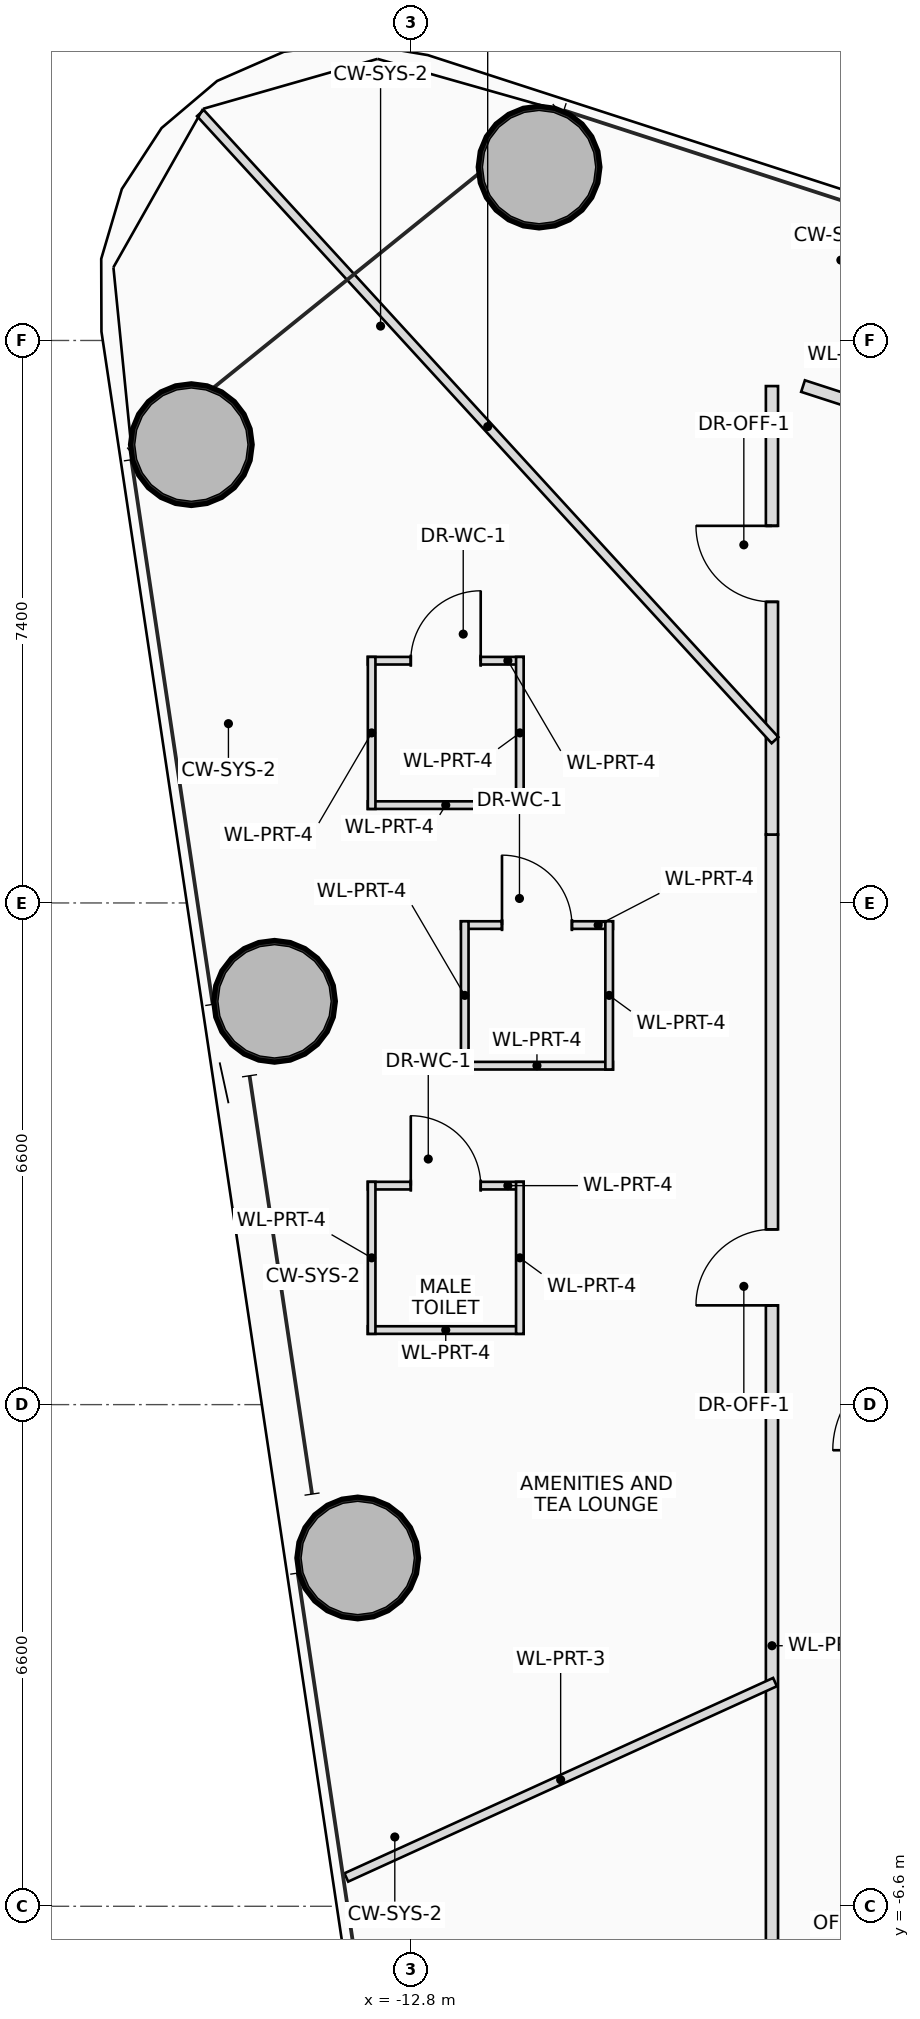
"""IFC4 building model, lengths in metres.
Left out: names, types, materials, properties, quantities, classifications, styles, units other than length and angle.
Written with IfcOpenShell. Run it as: python <this file> out.ifc"""

import sys

from ifc_helpers import new_model, si_unit, direction, frame, frame_2d, origin, origin_2d, place, context, subcontext, project, spatial, rectangle, hollow_circle, extrude, source, transform, mapped, element, fill, save


model = new_model("IFC4")
c1 = context("Model", 3, precision=1e-05, world=origin(), true_north=direction((0.0, 1.0)))
c2 = subcontext(c1, "Body", "Model", "MODEL_VIEW")
j1 = project(units=[si_unit("LENGTHUNIT", "METRE"), si_unit("PLANEANGLEUNIT", "RADIAN")], contexts=[c1])
p1 = place(None, origin())
s1 = spatial("IfcSite", under=j1, at=p1, CompositionType="ELEMENT")
p2 = place(p1, origin())
s2 = spatial("IfcBuilding", under=s1, at=p2, CompositionType="ELEMENT")
p3 = place(p2, frame((0.0, 0.0, 54.8)))
s3 = spatial("IfcBuildingStorey", under=s2, at=p3, CompositionType="ELEMENT", Elevation=54.8)
m1 = source(origin(), c2, "Body", "SweptSolid", [
    extrude(hollow_circle(Radius=0.8, WallThickness=0.055, at=origin_2d()), origin(), (0.0, 0.0, 1.0), 3.75),
])
for number, where, z_axis, x_axis in (
    (1, (-11.114, 16.281, 0.0), (0.0, 0.0, 1.0), (1.0, 0.0, 0.0)),
    (2, (-15.689, 12.629, 0.0), (0.0, 0.0, 1.0), (1.0, 0.0, 0.0)),
    (3, (-14.594, 5.306, 0.0), (0.0, 0.0, 1.0), (1.0, 0.0, 0.0)),
    (4, (-13.5, -2.018, 0.0), (0.0, 0.0, 1.0), (1.0, 0.0, 0.0)),
):
    element("IfcColumn", number, at=place(p3, frame(where, z_axis=z_axis, x_axis=x_axis)), inside=s3, PredefinedType="COLUMN", context=c2, shape_type="MappedRepresentation", body=[
        mapped(m1, transform((0.0, 0.0, 0.0), scale=1.0)),
    ])
p4 = place(p3, frame((-13.367, 2.881, 0.0), z_axis=(0.0, 0.0, 1.0), x_axis=(1.0, 0.0, 0.0)))
e5 = element("IfcWall", 5, at=p4, inside=s3, PredefinedType="PARTITIONING", context=c2, shape_type="SweptSolid", body=[
    extrude(rectangle(XDim=2.05, YDim=0.1, at=frame_2d((1.025, 0.0))), origin(), (0.0, 0.0, 1.0), 3.2),
])
p5 = place(p4, frame((0.565, 0.0, 0.0)))
e6 = element("IfcOpeningElement", 6, at=p5, cuts=e5, PredefinedType="OPENING", context=c2, shape_type="SweptSolid", body=[
    extrude(rectangle(XDim=0.92, YDim=2.1, at=frame_2d((0.46, 1.05))), frame((0.0, 0.06, 0.0), z_axis=(0.0, -1.0, 0.0), x_axis=(1.0, 0.0, 0.0)), (0.0, 0.0, 1.0), 0.12),
])
p6 = place(p3, frame((-11.317, 0.981, 0.0), z_axis=(0.0, 0.0, 1.0), x_axis=(-1.0, 0.0, 0.0)))
e7 = element("IfcWall", 7, at=p6, inside=s3, PredefinedType="PARTITIONING", context=c2, shape_type="SweptSolid", body=[
    extrude(rectangle(XDim=2.05, YDim=0.1, at=frame_2d((1.025, 0.0))), origin(), (0.0, 0.0, 1.0), 3.545),
])
p7 = place(p3, frame((-11.367, 2.931, 0.0), z_axis=(0.0, 0.0, 1.0), x_axis=(0.0, -1.0, 0.0)))
e8 = element("IfcWall", 8, at=p7, inside=s3, PredefinedType="PARTITIONING", context=c2, shape_type="SweptSolid", body=[
    extrude(rectangle(XDim=2.0, YDim=0.1, at=frame_2d((1.0, 0.0))), origin(), (0.0, 0.0, 1.0), 3.2),
])
p8 = place(p3, frame((-13.317, 0.931, 0.0), z_axis=(0.0, 0.0, 1.0), x_axis=(0.0, 1.0, 0.0)))
e9 = element("IfcWall", 9, at=p8, inside=s3, PredefinedType="PARTITIONING", context=c2, shape_type="SweptSolid", body=[
    extrude(rectangle(XDim=2.0, YDim=0.1, at=frame_2d((1.0, 0.0))), origin(), (0.0, 0.0, 1.0), 3.545),
])
p9 = place(p3, frame((-13.367, 9.787, 0.0), z_axis=(0.0, 0.0, 1.0), x_axis=(1.0, 0.0, 0.0)))
e10 = element("IfcWall", 10, at=p9, inside=s3, PredefinedType="PARTITIONING", context=c2, shape_type="SweptSolid", body=[
    extrude(rectangle(XDim=2.05, YDim=0.1, at=frame_2d((1.025, 0.0))), origin(), (0.0, 0.0, 1.0), 2.85),
])
p10 = place(p9, frame((0.565, 0.0, 0.0)))
e11 = element("IfcOpeningElement", 11, at=p10, cuts=e10, PredefinedType="OPENING", context=c2, shape_type="SweptSolid", body=[
    extrude(rectangle(XDim=0.92, YDim=2.1, at=frame_2d((0.46, 1.05))), frame((0.0, 0.06, 0.0), z_axis=(0.0, -1.0, 0.0), x_axis=(1.0, 0.0, 0.0)), (0.0, 0.0, 1.0), 0.12),
])
p11 = place(p3, frame((-11.317, 7.887, 0.0), z_axis=(0.0, 0.0, 1.0), x_axis=(-1.0, 0.0, 0.0)))
e12 = element("IfcWall", 12, at=p11, inside=s3, PredefinedType="PARTITIONING", context=c2, shape_type="SweptSolid", body=[
    extrude(rectangle(XDim=2.05, YDim=0.1, at=frame_2d((1.025, 0.0))), origin(), (0.0, 0.0, 1.0), 3.2),
])
p12 = place(p3, frame((-11.367, 9.837, 0.0), z_axis=(0.0, 0.0, 1.0), x_axis=(0.0, -1.0, 0.0)))
e13 = element("IfcWall", 13, at=p12, inside=s3, PredefinedType="PARTITIONING", context=c2, shape_type="SweptSolid", body=[
    extrude(rectangle(XDim=2.0, YDim=0.1, at=frame_2d((1.0, 0.0))), origin(), (0.0, 0.0, 1.0), 2.85),
])
p13 = place(p3, frame((-13.317, 7.837, 0.0), z_axis=(0.0, 0.0, 1.0), x_axis=(0.0, 1.0, 0.0)))
e14 = element("IfcWall", 14, at=p13, inside=s3, PredefinedType="PARTITIONING", context=c2, shape_type="SweptSolid", body=[
    extrude(rectangle(XDim=2.0, YDim=0.1, at=frame_2d((1.0, 0.0))), origin(), (0.0, 0.0, 1.0), 3.545),
])
p14 = place(p3, frame((-12.142, 6.309, 0.0), z_axis=(0.0, 0.0, 1.0), x_axis=(1.0, 0.0, 0.0)))
e15 = element("IfcWall", 15, at=p14, inside=s3, PredefinedType="PARTITIONING", context=c2, shape_type="SweptSolid", body=[
    extrude(rectangle(XDim=2.0, YDim=0.1, at=frame_2d((1.0, 0.0))), origin(), (0.0, 0.0, 1.0), 3.05),
])
p15 = place(p14, frame((0.54, 0.0, 0.0)))
e16 = element("IfcOpeningElement", 16, at=p15, cuts=e15, PredefinedType="OPENING", context=c2, shape_type="SweptSolid", body=[
    extrude(rectangle(XDim=0.92, YDim=2.1, at=frame_2d((0.46, 1.05))), frame((0.0, 0.06, 0.0), z_axis=(0.0, -1.0, 0.0), x_axis=(1.0, 0.0, 0.0)), (0.0, 0.0, 1.0), 0.12),
])
p16 = place(p3, frame((-10.142, 4.459, 0.0), z_axis=(0.0, 0.0, 1.0), x_axis=(-1.0, 0.0, 0.0)))
e17 = element("IfcWall", 17, at=p16, inside=s3, PredefinedType="PARTITIONING", context=c2, shape_type="SweptSolid", body=[
    extrude(rectangle(XDim=2.0, YDim=0.1, at=frame_2d((1.0, 0.0))), origin(), (0.0, 0.0, 1.0), 3.2),
])
for number, where, z_axis, x_axis in (
    (18, (-10.192, 6.359, 0.0), (0.0, 0.0, 1.0), (0.0, -1.0, 0.0)),
    (19, (-12.092, 4.409, 0.0), (0.0, 0.0, 1.0), (0.0, 1.0, 0.0)),
):
    element("IfcWall", number, at=place(p3, frame(where, z_axis=z_axis, x_axis=x_axis)), inside=s3, PredefinedType="PARTITIONING", context=c2, shape_type="SweptSolid", body=[
        extrude(rectangle(XDim=1.95, YDim=0.1, at=frame_2d((0.975, 0.0))), origin(), (0.0, 0.0, 1.0), 2.85),
    ])
p17 = place(p3, frame((-8.05, -7.5, 0.0), z_axis=(0.0, 0.0, 1.0), x_axis=(0.0, 1.0, 0.0)))
e20 = element("IfcWall", 20, at=p17, inside=s3, PredefinedType="PARTITIONING", context=c2, shape_type="SweptSolid", body=[
    extrude(rectangle(XDim=15.0, YDim=0.16, at=frame_2d((7.5, 0.0))), origin(), (0.0, 0.0, 1.0), 2.85),
])
p18 = place(p17, frame((8.806, 0.0, 0.0)))
e21 = element("IfcOpeningElement", 21, at=p18, cuts=e20, PredefinedType="OPENING", context=c2, shape_type="SweptSolid", body=[
    extrude(rectangle(XDim=1.0, YDim=2.25, at=frame_2d((0.5, 1.125))), frame((0.0, 0.09, 0.0), z_axis=(0.0, -1.0, 0.0), x_axis=(1.0, 0.0, 0.0)), (0.0, 0.0, 1.0), 0.18),
])
p19 = place(p3, frame((-8.05, 7.5, 0.0), z_axis=(0.0, 0.0, 1.0), x_axis=(0.0, 1.0, 0.0)))
e22 = element("IfcWall", 22, at=p19, inside=s3, PredefinedType="PARTITIONING", context=c2, shape_type="SweptSolid", body=[
    extrude(rectangle(XDim=5.9, YDim=0.16, at=frame_2d((2.95, 0.0))), origin(), (0.0, 0.0, 1.0), 2.85),
])
p20 = place(p19, frame((3.061, 0.0, 0.0)))
e23 = element("IfcOpeningElement", 23, at=p20, cuts=e22, PredefinedType="OPENING", context=c2, shape_type="SweptSolid", body=[
    extrude(rectangle(XDim=1.0, YDim=2.25, at=frame_2d((0.5, 1.125))), frame((0.0, 0.09, 0.0), z_axis=(0.0, -1.0, 0.0), x_axis=(1.0, 0.0, 0.0)), (0.0, 0.0, 1.0), 0.18),
])
p21 = place(p3, frame((-7.641, 13.4, 0.0), z_axis=(0.0, 0.0, 1.0), x_axis=(0.951277022007, -0.308337521884, 0.0)))
e24 = element("IfcWall", 24, at=p21, inside=s3, PredefinedType="PARTITIONING", context=c2, shape_type="SweptSolid", body=[
    extrude(rectangle(XDim=1.357, YDim=0.16, at=frame_2d((0.679, 0.0))), origin(), (0.0, 0.0, 1.0), 3.545),
])
p22 = place(p3, frame((-8.01, 8.741, 0.0), z_axis=(0.0, 0.0, 1.0), x_axis=(-0.675595196102, 0.737272765674, 0.0)))
e25 = element("IfcWall", 25, at=p22, inside=s3, PredefinedType="PARTITIONING", context=c2, shape_type="SweptSolid", body=[
    extrude(rectangle(XDim=11.19, YDim=0.12, at=frame_2d((5.595, 0.0))), origin(), (0.0, 0.0, 1.0), 3.01),
])
p23 = place(p3, frame((-8.01, -3.65, 0.0), z_axis=(0.0, 0.0, 1.0), x_axis=(-0.909955974898, -0.414704863425, 0.0)))
e26 = element("IfcWall", 26, at=p23, inside=s3, PredefinedType="PARTITIONING", context=c2, shape_type="SweptSolid", body=[
    extrude(rectangle(XDim=6.198, YDim=0.12, at=frame_2d((3.099, 0.0))), origin(), (0.0, 0.0, 1.0), 2.85),
])
p24 = place(p5, origin())
e27 = element("IfcDoor", 27, at=p24, inside=s3, OperationType="SINGLE_SWING_LEFT", PredefinedType="DOOR", context=c2, shape_type="SweptSolid", body=[
    extrude(rectangle(XDim=0.92, YDim=2.1, at=frame_2d((0.46, 1.05))), frame((0.0, 0.025, 0.0), z_axis=(0.0, -1.0, 0.0), x_axis=(1.0, 0.0, 0.0)), (0.0, 0.0, 1.0), 0.05),
])
fill(e6, e27)
p25 = place(p10, origin())
e28 = element("IfcDoor", 28, at=p25, inside=s3, OperationType="SINGLE_SWING_RIGHT", PredefinedType="DOOR", context=c2, shape_type="SweptSolid", body=[
    extrude(rectangle(XDim=0.92, YDim=2.1, at=frame_2d((0.46, 1.05))), frame((0.0, 0.025, 0.0), z_axis=(0.0, -1.0, 0.0), x_axis=(1.0, 0.0, 0.0)), (0.0, 0.0, 1.0), 0.05),
])
fill(e11, e28)
p26 = place(p15, origin())
e29 = element("IfcDoor", 29, at=p26, inside=s3, OperationType="SINGLE_SWING_LEFT", PredefinedType="DOOR", context=c2, shape_type="SweptSolid", body=[
    extrude(rectangle(XDim=0.92, YDim=2.1, at=frame_2d((0.46, 1.05))), frame((0.0, 0.025, 0.0), z_axis=(0.0, -1.0, 0.0), x_axis=(1.0, 0.0, 0.0)), (0.0, 0.0, 1.0), 0.05),
])
fill(e16, e29)
p27 = place(p18, origin())
e30 = element("IfcDoor", 30, at=p27, inside=s3, OperationType="SINGLE_SWING_LEFT", PredefinedType="DOOR", context=c2, shape_type="SweptSolid", body=[
    extrude(rectangle(XDim=1.0, YDim=2.25, at=frame_2d((0.5, 1.125))), frame((0.0, 0.025, 0.0), z_axis=(0.0, -1.0, 0.0), x_axis=(1.0, 0.0, 0.0)), (0.0, 0.0, 1.0), 0.05),
])
fill(e21, e30)
p28 = place(p20, origin())
e31 = element("IfcDoor", 31, at=p28, inside=s3, OperationType="SINGLE_SWING_RIGHT", PredefinedType="DOOR", context=c2, shape_type="SweptSolid", body=[
    extrude(rectangle(XDim=1.0, YDim=2.25, at=frame_2d((0.5, 1.125))), frame((0.0, 0.025, 0.0), z_axis=(0.0, -1.0, 0.0), x_axis=(1.0, 0.0, 0.0)), (0.0, 0.0, 1.0), 0.05),
])
fill(e23, e31)
save(model, sys.argv[1])
